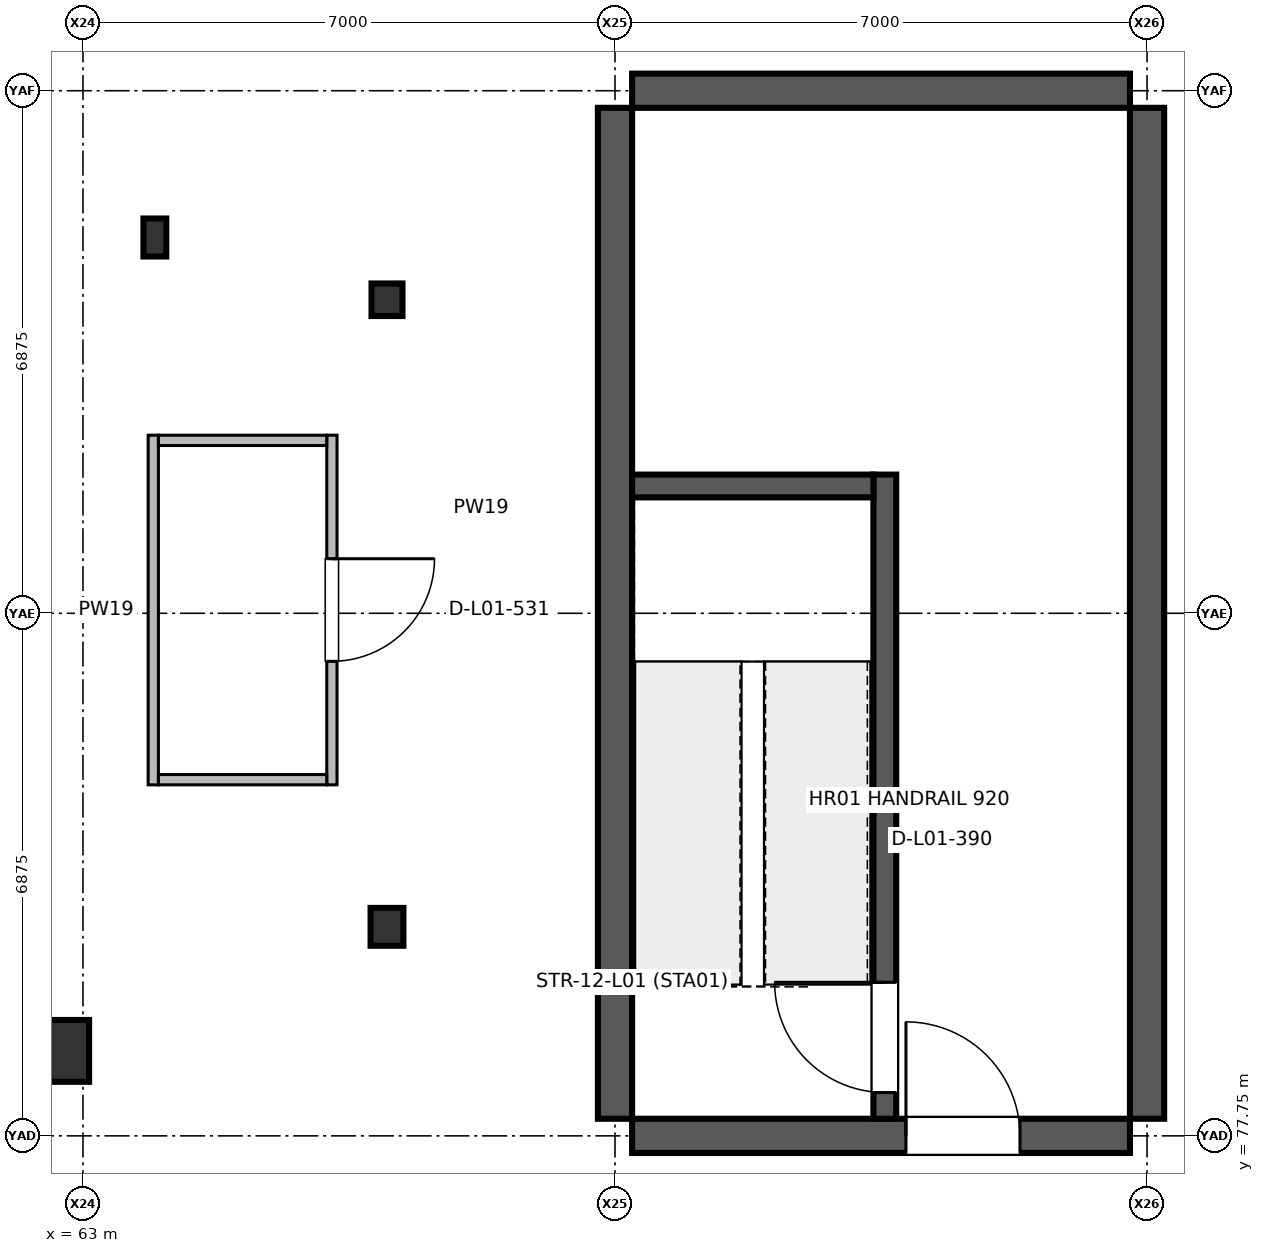
"""IFC4 building model, lengths in metres.
Left out: names, types, materials, properties, quantities, classifications, styles, units other than length and angle.
Written with IfcOpenShell. Run it as: python <this file> out.ifc"""

import sys

from ifc_helpers import new_model, si_unit, direction, frame, frame_2d, origin, origin_2d, place, context, subcontext, project, spatial, rectangle, hollow_rectangle, hollow_circle, i_section, extrude, element, fill, save


model = new_model("IFC4")
c1 = context("Model", 3, precision=1e-05, world=origin(), true_north=direction((0.0, 1.0)))
c2 = subcontext(c1, "Body", "Model", "MODEL_VIEW")
j1 = project(units=[si_unit("LENGTHUNIT", "METRE"), si_unit("PLANEANGLEUNIT", "RADIAN")], contexts=[c1])
p1 = place(None, origin())
s1 = spatial("IfcSite", under=j1, at=p1, CompositionType="ELEMENT")
p2 = place(p1, origin())
s2 = spatial("IfcBuilding", under=s1, at=p2, CompositionType="ELEMENT")
p3 = place(p2, origin())
s3 = spatial("IfcBuildingStorey", under=s2, at=p3, CompositionType="ELEMENT", Elevation=0.0)
p4 = place(p3, frame((67.0, 80.5, 0.0), z_axis=(0.0, 0.0, 1.0), x_axis=(1.0, 0.0, 0.0)))
e1 = element("IfcColumn", 1, at=p4, inside=s3, PredefinedType="COLUMN", context=c2, shape_type="SweptSolid", body=[
    extrude(i_section(OverallWidth=0.432, OverallDepth=0.498, WebThickness=0.024, FlangeThickness=0.038, at=origin_2d()), origin(), (0.0, 0.0, 1.0), 5.998),
])
p5 = place(p3, frame((67.0, 88.75, 0.0), z_axis=(0.0, 0.0, 1.0), x_axis=(1.0, 0.0, 0.0)))
e2 = element("IfcColumn", 2, at=p5, inside=s3, PredefinedType="COLUMN", context=c2, shape_type="SweptSolid", body=[
    extrude(i_section(OverallWidth=0.407, OverallDepth=0.428, WebThickness=0.02, FlangeThickness=0.035, at=origin_2d()), origin(), (0.0, 0.0, 1.0), 5.998),
])
p6 = place(p3, frame((63.946, 89.569, 0.076), z_axis=(-0.26627892052, 0.095218241849, 0.959181433779), x_axis=(-0.336708404663, -0.941608968855, 0.0)))
e3 = element("IfcColumn", 3, at=p6, inside=s3, PredefinedType="PILASTER", context=c2, shape_type="SweptSolid", body=[
    extrude(hollow_rectangle(XDim=0.3, YDim=0.5, WallThickness=0.02, at=origin_2d()), origin(), (0.0, 0.0, 1.0), 6.174),
])
p7 = place(p3, frame((62.674, 78.868, 0.155), z_axis=(-0.32565804507, -0.173062880004, 0.929513892982), x_axis=(0.469275854587, -0.883051624936, 0.0)))
e4 = element("IfcColumn", 4, at=p7, inside=s3, PredefinedType="PILASTER", context=c2, shape_type="SweptSolid", body=[
    extrude(hollow_circle(Radius=0.406, WallThickness=0.036, at=origin_2d()), origin(), (0.0, 0.0, 1.0), 6.286),
])
for number, where, z_axis, x_axis in (
    (5, (70.0, 77.975, 0.0), (0.0, 0.0, 1.0), (0.0, 1.0, 0.0)),
    (6, (77.0, 77.975, 0.0), (0.0, 0.0, 1.0), (0.0, 1.0, 0.0)),
):
    element("IfcWall", number, at=place(p3, frame(where, z_axis=z_axis, x_axis=x_axis)), inside=s3, PredefinedType="SHEAR", context=c2, shape_type="SweptSolid", body=[
        extrude(rectangle(XDim=13.3, YDim=0.45, at=frame_2d((6.65, 0.0))), origin(), (0.0, 0.0, 1.0), 5.78),
    ])
p8 = place(p3, frame((70.225, 77.75, 0.0), z_axis=(0.0, 0.0, 1.0), x_axis=(1.0, 0.0, 0.0)))
e7 = element("IfcWall", 7, at=p8, inside=s3, PredefinedType="SHEAR", context=c2, shape_type="SweptSolid", body=[
    extrude(rectangle(XDim=6.55, YDim=0.45, at=frame_2d((3.275, 0.0))), origin(), (0.0, 0.0, 1.0), 5.78),
])
p9 = place(p8, frame((3.603, 0.0, 0.0)))
e8 = element("IfcOpeningElement", 8, at=p9, cuts=e7, PredefinedType="OPENING", context=c2, shape_type="SweptSolid", body=[
    extrude(rectangle(XDim=1.5, YDim=2.2, at=frame_2d((0.75, 1.1))), frame((0.0, 0.235, 0.0), z_axis=(0.0, -1.0, 0.0), x_axis=(1.0, 0.0, 0.0)), (0.0, 0.0, 1.0), 0.47),
])
p10 = place(p3, frame((70.225, 91.5, 0.0), z_axis=(0.0, 0.0, 1.0), x_axis=(1.0, 0.0, 0.0)))
e9 = element("IfcWall", 9, at=p10, inside=s3, PredefinedType="SHEAR", context=c2, shape_type="SweptSolid", body=[
    extrude(rectangle(XDim=6.55, YDim=0.45, at=frame_2d((3.275, 0.0))), origin(), (0.0, 0.0, 1.0), 5.78),
])
p11 = place(p3, frame((73.55, 77.975, 0.0), z_axis=(0.0, 0.0, 1.0), x_axis=(0.0, 1.0, 0.0)))
e10 = element("IfcWall", 10, at=p11, inside=s3, PredefinedType="SHEAR", context=c2, shape_type="SweptSolid", body=[
    extrude(rectangle(XDim=8.475, YDim=0.3, at=frame_2d((4.237, 0.0))), origin(), (0.0, 0.0, 1.0), 5.78),
])
p12 = place(p11, frame((0.345, 0.0, 0.0)))
e11 = element("IfcOpeningElement", 11, at=p12, cuts=e10, PredefinedType="OPENING", context=c2, shape_type="SweptSolid", body=[
    extrude(rectangle(XDim=1.45, YDim=2.2, at=frame_2d((0.725, 1.1))), frame((0.0, 0.16, 0.0), z_axis=(0.0, -1.0, 0.0), x_axis=(1.0, 0.0, 0.0)), (0.0, 0.0, 1.0), 0.32),
])
p13 = place(p3, frame((66.275, 86.968, 0.0), z_axis=(0.0, 0.0, 1.0), x_axis=(0.0, -1.0, 0.0)))
e12 = element("IfcWall", 12, at=p13, inside=s3, PredefinedType="PARTITIONING", context=c2, shape_type="SweptSolid", body=[
    extrude(rectangle(XDim=4.6, YDim=0.135, at=frame_2d((2.3, 0.0))), origin(), (0.0, 0.0, 1.0), 5.02),
])
p14 = place(p13, frame((1.625, 0.0, 0.0)))
e13 = element("IfcOpeningElement", 13, at=p14, cuts=e12, PredefinedType="OPENING", context=c2, shape_type="SweptSolid", body=[
    extrude(rectangle(XDim=1.35, YDim=2.2, at=frame_2d((0.675, 1.1))), frame((0.0, 0.077, 0.0), z_axis=(0.0, -1.0, 0.0), x_axis=(1.0, 0.0, 0.0)), (0.0, 0.0, 1.0), 0.155),
])
p15 = place(p3, frame((63.925, 82.368, 0.0), z_axis=(0.0, 0.0, 1.0), x_axis=(0.0, 1.0, 0.0)))
e14 = element("IfcWall", 14, at=p15, inside=s3, PredefinedType="PARTITIONING", context=c2, shape_type="SweptSolid", body=[
    extrude(rectangle(XDim=4.6, YDim=0.135, at=frame_2d((2.3, 0.0))), origin(), (0.0, 0.0, 1.0), 5.02),
])
for number, where, z_axis, x_axis in (
    (15, (63.993, 82.436, 0.0), (0.0, 0.0, 1.0), (1.0, 0.0, 0.0)),
    (16, (63.993, 86.9, 0.0), (0.0, 0.0, 1.0), (1.0, 0.0, 0.0)),
):
    element("IfcWall", number, at=place(p3, frame(where, z_axis=z_axis, x_axis=x_axis)), inside=s3, PredefinedType="PARTITIONING", context=c2, shape_type="SweptSolid", body=[
        extrude(rectangle(XDim=2.214, YDim=0.135, at=frame_2d((1.107, 0.0))), origin(), (0.0, 0.0, 1.0), 5.02),
    ])
p16 = place(p3, frame((70.225, 86.3, 0.0), z_axis=(0.0, 0.0, 1.0), x_axis=(1.0, 0.0, 0.0)))
e17 = element("IfcWall", 17, at=p16, inside=s3, PredefinedType="SHEAR", context=c2, shape_type="SweptSolid", body=[
    extrude(rectangle(XDim=3.175, YDim=0.3, at=frame_2d((1.587, 0.0))), origin(), (0.0, 0.0, 1.0), 5.78),
])
p17 = place(p9, origin())
e18 = element("IfcDoor", 18, at=p17, inside=s3, OperationType="SINGLE_SWING_LEFT", PredefinedType="DOOR", context=c2, shape_type="SweptSolid", body=[
    extrude(rectangle(XDim=1.5, YDim=2.2, at=frame_2d((0.75, 1.1))), frame((0.0, 0.025, 0.0), z_axis=(0.0, -1.0, 0.0), x_axis=(1.0, 0.0, 0.0)), (0.0, 0.0, 1.0), 0.05),
])
fill(e8, e18)
p18 = place(p12, origin())
e19 = element("IfcDoor", 19, at=p18, inside=s3, OperationType="SINGLE_SWING_RIGHT", PredefinedType="DOOR", context=c2, shape_type="SweptSolid", body=[
    extrude(rectangle(XDim=1.45, YDim=2.2, at=frame_2d((0.725, 1.1))), frame((0.0, 0.025, 0.0), z_axis=(0.0, -1.0, 0.0), x_axis=(1.0, 0.0, 0.0)), (0.0, 0.0, 1.0), 0.05),
])
fill(e11, e19)
p19 = place(p14, origin())
e20 = element("IfcDoor", 20, at=p19, inside=s3, OperationType="SINGLE_SWING_LEFT", PredefinedType="DOOR", context=c2, shape_type="SweptSolid", body=[
    extrude(rectangle(XDim=1.35, YDim=2.2, at=frame_2d((0.675, 1.1))), frame((0.0, 0.025, 0.0), z_axis=(0.0, -1.0, 0.0), x_axis=(1.0, 0.0, 0.0)), (0.0, 0.0, 1.0), 0.05),
])
fill(e13, e20)
save(model, sys.argv[1])
